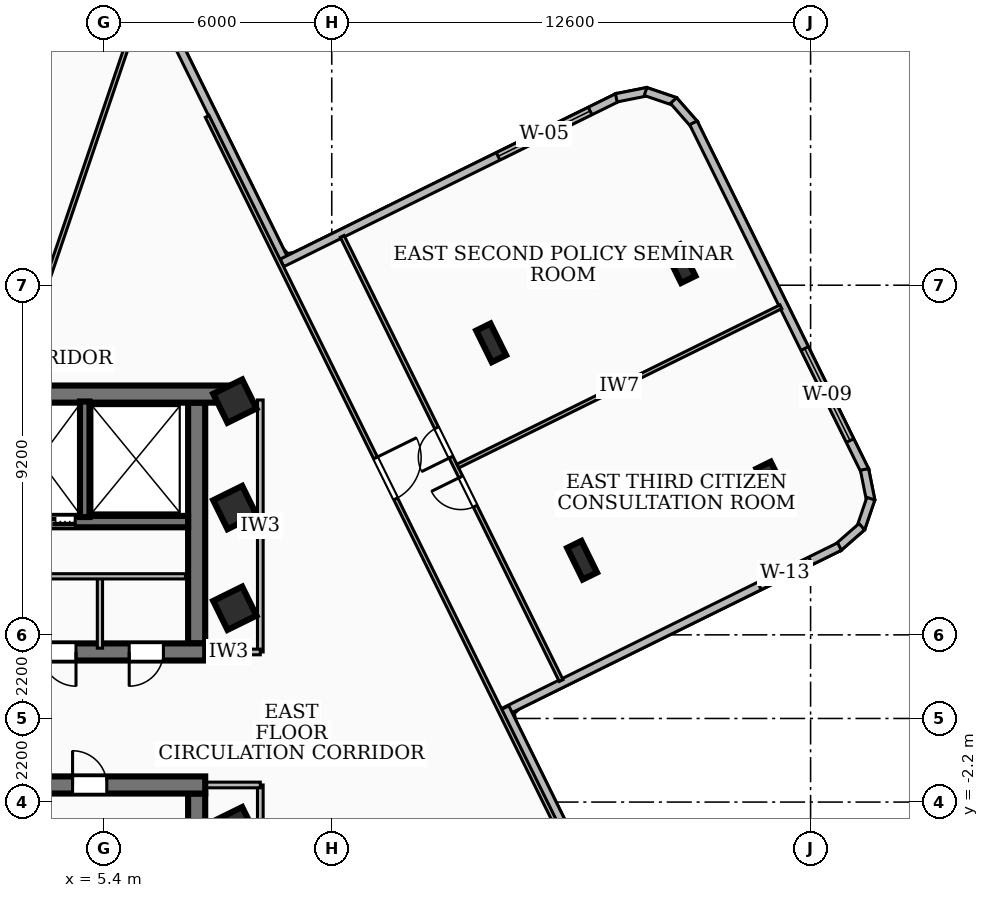
"""IFC4 building model, lengths in metres.
Left out: names, types, materials, properties, quantities, classifications, styles, units other than length and angle.
Written with IfcOpenShell. Run it as: python <this file> out.ifc"""

import sys

from ifc_helpers import new_model, si_unit, direction, frame, frame_2d, origin, origin_2d, place, context, subcontext, project, spatial, rectangle, i_section, extrude, element, fill, save


model = new_model("IFC4")
c1 = context("Model", 3, precision=1e-05, world=origin(), true_north=direction((0.0, 1.0)))
c2 = subcontext(c1, "Body", "Model", "MODEL_VIEW")
j1 = project(units=[si_unit("LENGTHUNIT", "METRE"), si_unit("PLANEANGLEUNIT", "RADIAN")], contexts=[c1])
p1 = place(None, origin())
s1 = spatial("IfcSite", under=j1, at=p1, CompositionType="ELEMENT")
p2 = place(p1, origin())
s2 = spatial("IfcBuilding", under=s1, at=p2, CompositionType="ELEMENT")
p3 = place(p2, frame((0.0, 0.0, 192.6)))
s3 = spatial("IfcBuildingStorey", under=s2, at=p3, CompositionType="ELEMENT", Elevation=192.6)
p4 = place(p3, frame((-8.78, 8.535, 0.0), z_axis=(0.0, 0.0, 1.0), x_axis=(1.0, 0.0, 0.0)))
e1 = element("IfcWall", 1, at=p4, inside=s3, PredefinedType="SHEAR", context=c2, shape_type="SweptSolid", body=[
    extrude(rectangle(XDim=17.56, YDim=0.45, at=frame_2d((8.78, 0.0))), origin(), (0.0, 0.0, 1.0), 3.2),
])
p5 = place(p3, frame((8.07, 1.75, 0.0), z_axis=(0.0, 0.0, 1.0), x_axis=(-1.0, 0.0, 0.0)))
e2 = element("IfcWall", 2, at=p5, inside=s3, PredefinedType="SHEAR", context=c2, shape_type="SweptSolid", body=[
    extrude(rectangle(XDim=16.14, YDim=0.45, at=frame_2d((8.07, 0.0))), origin(), (0.0, 0.0, 1.0), 3.2),
])
p6 = place(p5, frame((7.45, 0.0, 0.0)))
e3 = element("IfcOpeningElement", 3, at=p6, cuts=e2, PredefinedType="OPENING", context=c2, shape_type="SweptSolid", body=[
    extrude(rectangle(XDim=1.0, YDim=2.1, at=frame_2d((0.5, 1.05))), frame((0.0, 0.235, 0.0), z_axis=(0.0, -1.0, 0.0), x_axis=(1.0, 0.0, 0.0)), (0.0, 0.0, 1.0), 0.47),
])
p7 = place(p5, frame((3.4, 0.0, 0.0)))
e4 = element("IfcOpeningElement", 4, at=p7, cuts=e2, PredefinedType="OPENING", context=c2, shape_type="SweptSolid", body=[
    extrude(rectangle(XDim=0.9, YDim=2.06, at=frame_2d((0.45, 1.03))), frame((0.0, 0.235, 0.0), z_axis=(0.0, -1.0, 0.0), x_axis=(1.0, 0.0, 0.0)), (0.0, 0.0, 1.0), 0.47),
])
p8 = place(p5, frame((1.1, 0.0, 0.0)))
e5 = element("IfcOpeningElement", 5, at=p8, cuts=e2, PredefinedType="OPENING", context=c2, shape_type="SweptSolid", body=[
    extrude(rectangle(XDim=0.9, YDim=2.06, at=frame_2d((0.45, 1.03))), frame((0.0, 0.235, 0.0), z_axis=(0.0, -1.0, 0.0), x_axis=(1.0, 0.0, 0.0)), (0.0, 0.0, 1.0), 0.47),
])
p9 = place(p3, frame((7.845, 8.31, 0.0), z_axis=(0.0, 0.0, 1.0), x_axis=(0.0, -1.0, 0.0)))
e6 = element("IfcWall", 6, at=p9, inside=s3, PredefinedType="SHEAR", context=c2, shape_type="SweptSolid", body=[
    extrude(rectangle(XDim=6.335, YDim=0.45, at=frame_2d((3.167, 0.0))), origin(), (0.0, 0.0, 1.0), 3.2),
])
p10 = place(p3, frame((7.62, 5.18, 0.0), z_axis=(0.0, 0.0, 1.0), x_axis=(-1.0, 0.0, 0.0)))
e7 = element("IfcWall", 7, at=p10, inside=s3, PredefinedType="SOLIDWALL", context=c2, shape_type="SweptSolid", body=[
    extrude(rectangle(XDim=15.24, YDim=0.3, at=frame_2d((7.62, 0.0))), origin(), (0.0, 0.0, 1.0), 3.2),
])
p11 = place(p10, frame((5.77, 0.0, 0.0)))
e8 = element("IfcOpeningElement", 8, at=p11, cuts=e7, PredefinedType="OPENING", context=c2, shape_type="SweptSolid", body=[
    extrude(rectangle(XDim=1.1, YDim=2.15, at=frame_2d((0.55, 1.075))), frame((0.0, 0.16, 0.0), z_axis=(0.0, -1.0, 0.0), x_axis=(1.0, 0.0, 0.0)), (0.0, 0.0, 1.0), 0.32),
])
p12 = place(p10, frame((2.97, 0.0, 0.0)))
e9 = element("IfcOpeningElement", 9, at=p12, cuts=e7, PredefinedType="OPENING", context=c2, shape_type="SweptSolid", body=[
    extrude(rectangle(XDim=1.1, YDim=2.15, at=frame_2d((0.55, 1.075))), frame((0.0, 0.16, 0.0), z_axis=(0.0, -1.0, 0.0), x_axis=(1.0, 0.0, 0.0)), (0.0, 0.0, 1.0), 0.32),
])
p13 = place(p10, frame((7.97, 0.0, 0.0)))
e10 = element("IfcOpeningElement", 10, at=p13, cuts=e7, PredefinedType="OPENING", context=c2, shape_type="SweptSolid", body=[
    extrude(rectangle(XDim=1.0, YDim=2.1, at=frame_2d((0.5, 1.05))), frame((0.0, 0.16, 0.0), z_axis=(0.0, -1.0, 0.0), x_axis=(1.0, 0.0, 0.0)), (0.0, 0.0, 1.0), 0.32),
])
p14 = place(p3, frame((-8.07, -1.75, 0.0), z_axis=(0.0, 0.0, 1.0), x_axis=(1.0, 0.0, 0.0)))
e11 = element("IfcWall", 11, at=p14, inside=s3, PredefinedType="SHEAR", context=c2, shape_type="SweptSolid", body=[
    extrude(rectangle(XDim=16.14, YDim=0.45, at=frame_2d((8.07, 0.0))), origin(), (0.0, 0.0, 1.0), 3.2),
])
p15 = place(p14, frame((7.45, 0.0, 0.0)))
e12 = element("IfcOpeningElement", 12, at=p15, cuts=e11, PredefinedType="OPENING", context=c2, shape_type="SweptSolid", body=[
    extrude(rectangle(XDim=1.0, YDim=2.1, at=frame_2d((0.5, 1.05))), frame((0.0, 0.235, 0.0), z_axis=(0.0, -1.0, 0.0), x_axis=(1.0, 0.0, 0.0)), (0.0, 0.0, 1.0), 0.47),
])
p16 = place(p14, frame((12.65, 0.0, 0.0)))
e13 = element("IfcOpeningElement", 13, at=p16, cuts=e11, PredefinedType="OPENING", context=c2, shape_type="SweptSolid", body=[
    extrude(rectangle(XDim=0.9, YDim=2.06, at=frame_2d((0.45, 1.03))), frame((0.0, 0.235, 0.0), z_axis=(0.0, -1.0, 0.0), x_axis=(1.0, 0.0, 0.0)), (0.0, 0.0, 1.0), 0.47),
])
p17 = place(p14, frame((0.565, 0.0, 0.0)))
e14 = element("IfcOpeningElement", 14, at=p17, cuts=e11, PredefinedType="OPENING", context=c2, shape_type="SweptSolid", body=[
    extrude(rectangle(XDim=1.05, YDim=2.15, at=frame_2d((0.525, 1.075))), frame((0.0, 0.235, 0.0), z_axis=(0.0, -1.0, 0.0), x_axis=(1.0, 0.0, 0.0)), (0.0, 0.0, 1.0), 0.47),
])
p18 = place(p14, frame((2.125, 0.0, 0.0)))
e15 = element("IfcOpeningElement", 15, at=p18, cuts=e11, PredefinedType="OPENING", context=c2, shape_type="SweptSolid", body=[
    extrude(rectangle(XDim=1.05, YDim=2.15, at=frame_2d((0.525, 1.075))), frame((0.0, 0.235, 0.0), z_axis=(0.0, -1.0, 0.0), x_axis=(1.0, 0.0, 0.0)), (0.0, 0.0, 1.0), 0.47),
])
p19 = place(p14, frame((3.685, 0.0, 0.0)))
e16 = element("IfcOpeningElement", 16, at=p19, cuts=e11, PredefinedType="OPENING", context=c2, shape_type="SweptSolid", body=[
    extrude(rectangle(XDim=1.05, YDim=2.15, at=frame_2d((0.525, 1.075))), frame((0.0, 0.235, 0.0), z_axis=(0.0, -1.0, 0.0), x_axis=(1.0, 0.0, 0.0)), (0.0, 0.0, 1.0), 0.47),
])
p20 = place(p3, frame((7.845, -1.975, 0.0), z_axis=(0.0, 0.0, 1.0), x_axis=(0.0, -1.0, 0.0)))
e17 = element("IfcWall", 17, at=p20, inside=s3, PredefinedType="SHEAR", context=c2, shape_type="SweptSolid", body=[
    extrude(rectangle(XDim=6.335, YDim=0.45, at=frame_2d((3.167, 0.0))), origin(), (0.0, 0.0, 1.0), 3.2),
])
p21 = place(p3, frame((4.9, 5.3, 0.0), z_axis=(0.0, 0.0, 1.0), x_axis=(0.0, 1.0, 0.0)))
e18 = element("IfcWall", 18, at=p21, inside=s3, PredefinedType="SOLIDWALL", context=c2, shape_type="SweptSolid", body=[
    extrude(rectangle(XDim=3.04, YDim=0.25, at=frame_2d((1.52, 0.0))), origin(), (0.0, 0.0, 1.0), 3.2),
])
for number, where, z_axis, x_axis in (
    (19, (8.85, -2.9, 0.0), (0.0, 0.0, 1.0), (0.897, 0.442, 0.0)),
    (20, (8.85, 2.9, 0.0), (0.0, 0.0, 1.0), (0.897, 0.442, 0.0)),
    (21, (8.85, 5.55, 0.0), (0.0, 0.0, 1.0), (0.897, 0.442, 0.0)),
    (22, (8.85, 8.35, 0.0), (0.0, 0.0, 1.0), (0.897, 0.442, 0.0)),
):
    element("IfcColumn", number, at=place(p3, frame(where, z_axis=z_axis, x_axis=x_axis)), inside=s3, PredefinedType="COLUMN", context=c2, shape_type="SweptSolid", body=[
        extrude(rectangle(XDim=0.85, YDim=0.85, at=origin_2d()), origin(), (0.0, 0.0, 1.0), 3.6),
    ])
for number, where, z_axis, x_axis in (
    (23, (17.987, 4.164, 0.0), (0.0, 0.0, 1.0), (0.897, 0.442, 0.0)),
    (24, (15.594, 9.883, 0.0), (0.0, 0.0, 1.0), (0.897, 0.442, 0.0)),
    (25, (22.968, 6.248, 0.0), (0.0, 0.0, 1.0), (0.897, 0.442, 0.0)),
    (26, (20.576, 11.967, 0.0), (0.0, 0.0, 1.0), (0.897, 0.442, 0.0)),
):
    element("IfcColumn", number, at=place(p3, frame(where, z_axis=z_axis, x_axis=x_axis)), inside=s3, PredefinedType="COLUMN", context=c2, shape_type="SweptSolid", body=[
        extrude(i_section(OverallWidth=0.418, OverallDepth=0.927, WebThickness=0.019, FlangeThickness=0.032, at=origin_2d()), origin(), (0.0, 0.0, 1.0), 3.6),
    ])
p22 = place(p3, frame((-0.284, 15.96, 0.0), z_axis=(0.0, 0.0, 1.0), x_axis=(0.897012793167, 0.442004580174, 0.0)))
e27 = element("IfcWall", 27, at=p22, inside=s3, PredefinedType="SOLIDWALL", context=c2, shape_type="SweptSolid", body=[
    extrude(rectangle(XDim=6.158, YDim=0.22, at=frame_2d((3.079, 0.0))), origin(), (0.0, 0.0, 1.0), 3.2),
])
p23 = place(p3, frame((7.222, 18.009, 0.0), z_axis=(0.0, 0.0, 1.0), x_axis=(0.44217743079, -0.896927600032, 0.0)))
e28 = element("IfcWall", 28, at=p23, inside=s3, PredefinedType="SOLIDWALL", context=c2, shape_type="SweptSolid", body=[
    extrude(rectangle(XDim=6.758, YDim=0.22, at=frame_2d((3.379, 0.0))), origin(), (0.0, 0.0, 1.0), 3.2),
])
p24 = place(p3, frame((10.092, 11.988, 0.0), z_axis=(0.0, 0.0, 1.0), x_axis=(0.896973397182, 0.442084522177, 0.0)))
e29 = element("IfcWall", 29, at=p24, inside=s3, PredefinedType="SOLIDWALL", context=c2, shape_type="SweptSolid", body=[
    extrude(rectangle(XDim=9.858, YDim=0.22, at=frame_2d((4.929, 0.0))), origin(), (0.0, 0.0, 1.0), 3.2),
])
p25 = place(p24, frame((6.339, 0.0, 0.85)))
e30 = element("IfcOpeningElement", 30, at=p25, cuts=e29, PredefinedType="OPENING", context=c2, shape_type="SweptSolid", body=[
    extrude(rectangle(XDim=2.7, YDim=1.85, at=frame_2d((1.35, 0.925))), frame((0.0, 0.12, 0.0), z_axis=(0.0, -1.0, 0.0), x_axis=(1.0, 0.0, 0.0)), (0.0, 0.0, 1.0), 0.24),
])
p26 = place(p3, frame((18.887, 16.33, 0.0), z_axis=(0.0, 0.0, 1.0), x_axis=(0.980804908934, 0.194991616769, 0.0)))
e31 = element("IfcWall", 31, at=p26, inside=s3, PredefinedType="SOLIDWALL", context=c2, shape_type="SweptSolid", body=[
    extrude(rectangle(XDim=0.835, YDim=0.22, at=frame_2d((0.417, 0.0))), origin(), (0.0, 0.0, 1.0), 3.2),
])
p27 = place(p3, frame((19.657, 16.496, 0.0), z_axis=(0.0, 0.0, 1.0), x_axis=(0.94679268696, -0.321844073921, 0.0)))
e32 = element("IfcWall", 32, at=p27, inside=s3, PredefinedType="SOLIDWALL", context=c2, shape_type="SweptSolid", body=[
    extrude(rectangle(XDim=0.821, YDim=0.22, at=frame_2d((0.41, 0.0))), origin(), (0.0, 0.0, 1.0), 3.2),
])
p28 = place(p3, frame((20.394, 16.259, 0.0), z_axis=(0.0, 0.0, 1.0), x_axis=(0.658836376907, -0.752286267629, 0.0)))
e33 = element("IfcWall", 33, at=p28, inside=s3, PredefinedType="SOLIDWALL", context=c2, shape_type="SweptSolid", body=[
    extrude(rectangle(XDim=0.833, YDim=0.22, at=frame_2d((0.417, 0.0))), origin(), (0.0, 0.0, 1.0), 3.2),
])
p29 = place(p3, frame((20.916, 15.673, 0.0), z_axis=(0.0, 0.0, 1.0), x_axis=(0.442161398101, -0.896935503829, 0.0)))
e34 = element("IfcWall", 34, at=p29, inside=s3, PredefinedType="SOLIDWALL", context=c2, shape_type="SweptSolid", body=[
    extrude(rectangle(XDim=10.22, YDim=0.22, at=frame_2d((5.11, 0.0))), origin(), (0.0, 0.0, 1.0), 3.2),
])
p30 = place(p29, frame((6.622, 0.0, 0.85)))
e35 = element("IfcOpeningElement", 35, at=p30, cuts=e34, PredefinedType="OPENING", context=c2, shape_type="SweptSolid", body=[
    extrude(rectangle(XDim=2.7, YDim=1.65, at=frame_2d((1.35, 0.825))), frame((0.0, 0.12, 0.0), z_axis=(0.0, -1.0, 0.0), x_axis=(1.0, 0.0, 0.0)), (0.0, 0.0, 1.0), 0.24),
])
p31 = place(p3, frame((25.419, 6.553, 0.0), z_axis=(0.0, 0.0, 1.0), x_axis=(0.195272818647, -0.980748961915, 0.0)))
e36 = element("IfcWall", 36, at=p31, inside=s3, PredefinedType="SOLIDWALL", context=c2, shape_type="SweptSolid", body=[
    extrude(rectangle(XDim=0.835, YDim=0.22, at=frame_2d((0.417, 0.0))), origin(), (0.0, 0.0, 1.0), 3.2),
])
p32 = place(p3, frame((25.585, 5.783, 0.0), z_axis=(0.0, 0.0, 1.0), x_axis=(-0.321667999976, -0.946852521669, 0.0)))
e37 = element("IfcWall", 37, at=p32, inside=s3, PredefinedType="SOLIDWALL", context=c2, shape_type="SweptSolid", body=[
    extrude(rectangle(XDim=0.821, YDim=0.22, at=frame_2d((0.41, 0.0))), origin(), (0.0, 0.0, 1.0), 3.2),
])
p33 = place(p3, frame((25.348, 5.046, 0.0), z_axis=(0.0, 0.0, 1.0), x_axis=(-0.752939273058, -0.658090002269, 0.0)))
e38 = element("IfcWall", 38, at=p33, inside=s3, PredefinedType="SOLIDWALL", context=c2, shape_type="SweptSolid", body=[
    extrude(rectangle(XDim=0.834, YDim=0.22, at=frame_2d((0.417, 0.0))), origin(), (0.0, 0.0, 1.0), 3.2),
])
p34 = place(p3, frame((24.761, 4.524, 0.0), z_axis=(0.0, 0.0, 1.0), x_axis=(-0.896954033158, -0.442123808905, 0.0)))
e39 = element("IfcWall", 39, at=p34, inside=s3, PredefinedType="SOLIDWALL", context=c2, shape_type="SweptSolid", body=[
    extrude(rectangle(XDim=9.857, YDim=0.22, at=frame_2d((4.928, 0.0))), origin(), (0.0, 0.0, 1.0), 3.2),
])
p35 = place(p34, frame((0.85, 0.0, 0.85)))
e40 = element("IfcOpeningElement", 40, at=p35, cuts=e39, PredefinedType="OPENING", context=c2, shape_type="SweptSolid", body=[
    extrude(rectangle(XDim=1.5, YDim=1.8, at=frame_2d((0.75, 0.9))), frame((0.0, 0.12, 0.0), z_axis=(0.0, -1.0, 0.0), x_axis=(1.0, 0.0, 0.0)), (0.0, 0.0, 1.0), 0.24),
])
p36 = place(p3, frame((15.96, 0.284, 0.0), z_axis=(0.0, 0.0, 1.0), x_axis=(0.442004580174, -0.897012793167, 0.0)))
e41 = element("IfcWall", 41, at=p36, inside=s3, PredefinedType="SOLIDWALL", context=c2, shape_type="SweptSolid", body=[
    extrude(rectangle(XDim=6.158, YDim=0.22, at=frame_2d((3.079, 0.0))), origin(), (0.0, 0.0, 1.0), 3.2),
])
p37 = place(p3, frame((2.9, 3.74, 0.0), z_axis=(0.0, 0.0, 1.0), x_axis=(1.0, 0.0, 0.0)))
e42 = element("IfcWall", 42, at=p37, inside=s3, PredefinedType="PARTITIONING", context=c2, shape_type="SweptSolid", body=[
    extrude(rectangle(XDim=4.65, YDim=0.138, at=frame_2d((2.325, 0.0))), origin(), (0.0, 0.0, 1.0), 3.2),
])
p38 = place(p3, frame((5.3, 1.85, 0.0), z_axis=(0.0, 0.0, 1.0), x_axis=(0.0, 1.0, 0.0)))
e43 = element("IfcWall", 43, at=p38, inside=s3, PredefinedType="PARTITIONING", context=c2, shape_type="SweptSolid", body=[
    extrude(rectangle(XDim=1.89, YDim=0.138, at=frame_2d((0.945, 0.0))), origin(), (0.0, 0.0, 1.0), 2.43),
])
p39 = place(p3, frame((9.52, 1.75, 0.0), z_axis=(0.0, 0.0, 1.0), x_axis=(0.0, 1.0, 0.0)))
e44 = element("IfcWall", 44, at=p39, inside=s3, PredefinedType="PARTITIONING", context=c2, shape_type="SweptSolid", body=[
    extrude(rectangle(XDim=6.63, YDim=0.15, at=frame_2d((3.315, 0.0))), origin(), (0.0, 0.0, 1.0), 2.504),
])
p40 = place(p3, frame((7.85, 1.75, 0.0), z_axis=(0.0, 0.0, 1.0), x_axis=(1.0, 0.0, 0.0)))
e45 = element("IfcWall", 45, at=p40, inside=s3, PredefinedType="PARTITIONING", context=c2, shape_type="SweptSolid", body=[
    extrude(rectangle(XDim=1.67, YDim=0.15, at=frame_2d((0.835, 0.0))), origin(), (0.0, 0.0, 1.0), 2.43),
])
p41 = place(p3, frame((9.52, -8.38, 0.0), z_axis=(0.0, 0.0, 1.0), x_axis=(0.0, 1.0, 0.0)))
e46 = element("IfcWall", 46, at=p41, inside=s3, PredefinedType="PARTITIONING", context=c2, shape_type="SweptSolid", body=[
    extrude(rectangle(XDim=6.63, YDim=0.15, at=frame_2d((3.315, 0.0))), origin(), (0.0, 0.0, 1.0), 3.2),
])
p42 = place(p3, frame((7.85, -1.75, 0.0), z_axis=(0.0, 0.0, 1.0), x_axis=(1.0, 0.0, 0.0)))
e47 = element("IfcWall", 47, at=p42, inside=s3, PredefinedType="PARTITIONING", context=c2, shape_type="SweptSolid", body=[
    extrude(rectangle(XDim=1.67, YDim=0.15, at=frame_2d((0.835, 0.0))), origin(), (0.0, 0.0, 1.0), 2.43),
])
p43 = place(p3, frame((3.666, 10.794, 0.0), z_axis=(0.0, 0.0, 1.0), x_axis=(0.32157793417, 0.946883114357, 0.0)))
e48 = element("IfcWall", 48, at=p43, inside=s3, PredefinedType="PARTITIONING", context=c2, shape_type="SweptSolid", body=[
    extrude(rectangle(XDim=8.274, YDim=0.11, at=frame_2d((4.137, 0.0))), origin(), (0.0, 0.0, 1.0), 3.2),
])
p44 = place(p3, frame((8.122, 15.843, 0.0), z_axis=(0.0, 0.0, 1.0), x_axis=(0.442129285211, -0.896951333774, 0.0)))
e49 = element("IfcWall", 49, at=p44, inside=s3, PredefinedType="PARTITIONING", context=c2, shape_type="SweptSolid", body=[
    extrude(rectangle(XDim=20.639, YDim=0.11, at=frame_2d((10.319, 0.0))), origin(), (0.0, 0.0, 1.0), 2.504),
])
p45 = place(p44, frame((10.02, 0.0, 0.0)))
e50 = element("IfcOpeningElement", 50, at=p45, cuts=e49, PredefinedType="OPENING", context=c2, shape_type="SweptSolid", body=[
    extrude(rectangle(XDim=1.2, YDim=2.1, at=frame_2d((0.6, 1.05))), frame((0.0, 0.065, 0.0), z_axis=(0.0, -1.0, 0.0), x_axis=(1.0, 0.0, 0.0)), (0.0, 0.0, 1.0), 0.13),
])
p46 = place(p3, frame((14.72, 6.643, 0.0), z_axis=(0.0, 0.0, 1.0), x_axis=(0.896948430533, 0.442135174991, 0.0)))
e51 = element("IfcWall", 51, at=p46, inside=s3, PredefinedType="PARTITIONING", context=c2, shape_type="SweptSolid", body=[
    extrude(rectangle(XDim=9.474, YDim=0.11, at=frame_2d((4.737, 0.0))), origin(), (0.0, 0.0, 1.0), 3.2),
])
p47 = place(p3, frame((17.436, 0.997, 0.0), z_axis=(0.0, 0.0, 1.0), x_axis=(-0.442139902385, 0.896946100231, 0.0)))
e52 = element("IfcWall", 52, at=p47, inside=s3, PredefinedType="PARTITIONING", context=c2, shape_type="SweptSolid", body=[
    extrude(rectangle(XDim=13.03, YDim=0.11, at=frame_2d((6.515, 0.0))), origin(), (0.0, 0.0, 1.0), 2.504),
])
p48 = place(p47, frame((5.115, 0.0, 0.0)))
e53 = element("IfcOpeningElement", 53, at=p48, cuts=e52, PredefinedType="OPENING", context=c2, shape_type="SweptSolid", body=[
    extrude(rectangle(XDim=0.86, YDim=2.04, at=frame_2d((0.43, 1.02))), frame((0.0, 0.065, 0.0), z_axis=(0.0, -1.0, 0.0), x_axis=(1.0, 0.0, 0.0)), (0.0, 0.0, 1.0), 0.13),
])
p49 = place(p47, frame((6.555, 0.0, 0.0)))
e54 = element("IfcOpeningElement", 54, at=p49, cuts=e52, PredefinedType="OPENING", context=c2, shape_type="SweptSolid", body=[
    extrude(rectangle(XDim=0.86, YDim=2.04, at=frame_2d((0.43, 1.02))), frame((0.0, 0.065, 0.0), z_axis=(0.0, -1.0, 0.0), x_axis=(1.0, 0.0, 0.0)), (0.0, 0.0, 1.0), 0.13),
])
p50 = place(p25, origin())
e55 = element("IfcWindow", 55, at=p50, inside=s3, PartitioningType="SINGLE_PANEL", PredefinedType="WINDOW", context=c2, shape_type="SweptSolid", body=[
    extrude(rectangle(XDim=2.7, YDim=1.85, at=frame_2d((1.35, 0.925))), frame((0.0, 0.03, 0.0), z_axis=(0.0, -1.0, 0.0), x_axis=(1.0, 0.0, 0.0)), (0.0, 0.0, 1.0), 0.06),
])
fill(e30, e55)
p51 = place(p30, origin())
e56 = element("IfcWindow", 56, at=p51, inside=s3, PartitioningType="SINGLE_PANEL", PredefinedType="WINDOW", context=c2, shape_type="SweptSolid", body=[
    extrude(rectangle(XDim=2.7, YDim=1.65, at=frame_2d((1.35, 0.825))), frame((0.0, 0.03, 0.0), z_axis=(0.0, -1.0, 0.0), x_axis=(1.0, 0.0, 0.0)), (0.0, 0.0, 1.0), 0.06),
])
fill(e35, e56)
p52 = place(p35, origin())
e57 = element("IfcWindow", 57, at=p52, inside=s3, PartitioningType="SINGLE_PANEL", PredefinedType="WINDOW", context=c2, shape_type="SweptSolid", body=[
    extrude(rectangle(XDim=1.5, YDim=1.8, at=frame_2d((0.75, 0.9))), frame((0.0, 0.03, 0.0), z_axis=(0.0, -1.0, 0.0), x_axis=(1.0, 0.0, 0.0)), (0.0, 0.0, 1.0), 0.06),
])
fill(e40, e57)
p53 = place(p12, origin())
e58 = element("IfcDoor", 58, at=p53, inside=s3, OperationType="DOUBLE_DOOR_SLIDING", PredefinedType="DOOR", context=c2, shape_type="SweptSolid", body=[
    extrude(rectangle(XDim=1.1, YDim=2.15, at=frame_2d((0.55, 1.075))), frame((0.0, 0.025, 0.0), z_axis=(0.0, -1.0, 0.0), x_axis=(1.0, 0.0, 0.0)), (0.0, 0.0, 1.0), 0.05),
])
fill(e9, e58)
p54 = place(p16, origin())
e59 = element("IfcDoor", 59, at=p54, inside=s3, OperationType="SINGLE_SWING_LEFT", PredefinedType="DOOR", context=c2, shape_type="SweptSolid", body=[
    extrude(rectangle(XDim=0.9, YDim=2.06, at=frame_2d((0.45, 1.03))), frame((0.0, 0.025, 0.0), z_axis=(0.0, -1.0, 0.0), x_axis=(1.0, 0.0, 0.0)), (0.0, 0.0, 1.0), 0.05),
])
fill(e13, e59)
p55 = place(p7, origin())
e60 = element("IfcDoor", 60, at=p55, inside=s3, OperationType="SINGLE_SWING_LEFT", PredefinedType="DOOR", context=c2, shape_type="SweptSolid", body=[
    extrude(rectangle(XDim=0.9, YDim=2.06, at=frame_2d((0.45, 1.03))), frame((0.0, 0.025, 0.0), z_axis=(0.0, -1.0, 0.0), x_axis=(1.0, 0.0, 0.0)), (0.0, 0.0, 1.0), 0.05),
])
fill(e4, e60)
p56 = place(p8, origin())
e61 = element("IfcDoor", 61, at=p56, inside=s3, OperationType="SINGLE_SWING_RIGHT", PredefinedType="DOOR", context=c2, shape_type="SweptSolid", body=[
    extrude(rectangle(XDim=0.9, YDim=2.06, at=frame_2d((0.45, 1.03))), frame((0.0, 0.025, 0.0), z_axis=(0.0, -1.0, 0.0), x_axis=(1.0, 0.0, 0.0)), (0.0, 0.0, 1.0), 0.05),
])
fill(e5, e61)
p57 = place(p45, origin())
e62 = element("IfcDoor", 62, at=p57, inside=s3, OperationType="SINGLE_SWING_LEFT", PredefinedType="DOOR", context=c2, shape_type="SweptSolid", body=[
    extrude(rectangle(XDim=1.2, YDim=2.1, at=frame_2d((0.6, 1.05))), frame((0.0, 0.025, 0.0), z_axis=(0.0, -1.0, 0.0), x_axis=(1.0, 0.0, 0.0)), (0.0, 0.0, 1.0), 0.05),
])
fill(e50, e62)
p58 = place(p48, origin())
e63 = element("IfcDoor", 63, at=p58, inside=s3, OperationType="SINGLE_SWING_RIGHT", PredefinedType="DOOR", context=c2, shape_type="SweptSolid", body=[
    extrude(rectangle(XDim=0.86, YDim=2.04, at=frame_2d((0.43, 1.02))), frame((0.0, 0.025, 0.0), z_axis=(0.0, -1.0, 0.0), x_axis=(1.0, 0.0, 0.0)), (0.0, 0.0, 1.0), 0.05),
])
fill(e53, e63)
p59 = place(p49, origin())
e64 = element("IfcDoor", 64, at=p59, inside=s3, OperationType="SINGLE_SWING_LEFT", PredefinedType="DOOR", context=c2, shape_type="SweptSolid", body=[
    extrude(rectangle(XDim=0.86, YDim=2.04, at=frame_2d((0.43, 1.02))), frame((0.0, 0.025, 0.0), z_axis=(0.0, -1.0, 0.0), x_axis=(1.0, 0.0, 0.0)), (0.0, 0.0, 1.0), 0.05),
])
fill(e54, e64)
save(model, sys.argv[1])
